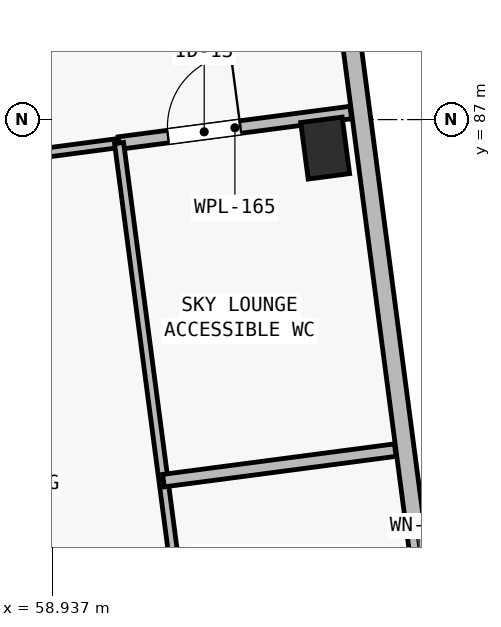
"""IFC4 building model, lengths in metres.
Left out: names, types, materials, properties, quantities, classifications, styles, units other than length and angle.
Written with IfcOpenShell. Run it as: python <this file> out.ifc"""

import sys

from ifc_helpers import new_model, si_unit, direction, frame, frame_2d, origin, origin_2d, place, context, subcontext, project, spatial, rectangle, extrude, element, fill, save


model = new_model("IFC4")
c1 = context("Model", 3, precision=1e-05, world=origin(), true_north=direction((0.0, 1.0)))
c2 = subcontext(c1, "Body", "Model", "MODEL_VIEW")
j1 = project(units=[si_unit("LENGTHUNIT", "METRE"), si_unit("PLANEANGLEUNIT", "RADIAN")], contexts=[c1])
p1 = place(None, origin())
s1 = spatial("IfcSite", under=j1, at=p1, CompositionType="ELEMENT")
p2 = place(p1, origin())
s2 = spatial("IfcBuilding", under=s1, at=p2, CompositionType="ELEMENT")
p3 = place(p2, frame((0.0, 0.0, 14.9)))
s3 = spatial("IfcBuildingStorey", under=s2, at=p3, CompositionType="ELEMENT", Elevation=14.9)
p4 = place(p3, frame((62.53, 86.625, 0.0), z_axis=(0.0, 0.0, 1.0), x_axis=(0.991444861374, 0.13052619222, 0.0)))
e1 = element("IfcColumn", 1, at=p4, inside=s3, PredefinedType="COLUMN", context=c2, shape_type="SweptSolid", body=[
    extrude(rectangle(XDim=0.55, YDim=0.75, at=origin_2d()), origin(), (0.0, 0.0, 1.0), 3.25),
])
p5 = place(p3, frame((61.39, 99.31, 0.0), z_axis=(0.0, 0.0, 1.0), x_axis=(0.13052411616, -0.99144513469, 0.0)))
e2 = element("IfcWall", 2, at=p5, inside=s3, PredefinedType="SOLIDWALL", context=c2, shape_type="SweptSolid", body=[
    extrude(rectangle(XDim=21.05, YDim=0.24, at=frame_2d((10.525, 0.0))), origin(), (0.0, 0.0, 1.0), 3.0),
])
p6 = place(p5, frame((2.45, 0.0, 0.45)))
e3 = element("IfcOpeningElement", 3, at=p6, cuts=e2, PredefinedType="OPENING", context=c2, shape_type="SweptSolid", body=[
    extrude(rectangle(XDim=0.68, YDim=2.24, at=frame_2d((0.34, 1.12))), frame((0.0, 0.135, 0.0), z_axis=(0.0, -1.0, 0.0), x_axis=(1.0, 0.0, 0.0)), (0.0, 0.0, 1.0), 0.27),
])
p7 = place(p5, frame((17.78, 0.0, 0.52)))
e4 = element("IfcOpeningElement", 4, at=p7, cuts=e2, PredefinedType="OPENING", context=c2, shape_type="SweptSolid", body=[
    extrude(rectangle(XDim=0.82, YDim=2.18, at=frame_2d((0.41, 1.09))), frame((0.0, 0.135, 0.0), z_axis=(0.0, -1.0, 0.0), x_axis=(1.0, 0.0, 0.0)), (0.0, 0.0, 1.0), 0.27),
])
p8 = place(p3, frame((54.033, 85.93, 0.0), z_axis=(0.0, 0.0, 1.0), x_axis=(0.991442898952, 0.130541097431, 0.0)))
e5 = element("IfcWall", 5, at=p8, inside=s3, PredefinedType="PARTITIONING", context=c2, shape_type="SweptSolid", body=[
    extrude(rectangle(XDim=5.835, YDim=0.12, at=frame_2d((2.917, 0.0))), origin(), (0.0, 0.0, 1.0), 2.97),
])
p9 = place(p8, frame((1.15, 0.0, 0.0)))
e6 = element("IfcOpeningElement", 6, at=p9, cuts=e5, PredefinedType="OPENING", context=c2, shape_type="SweptSolid", body=[
    extrude(rectangle(XDim=1.15, YDim=2.15, at=frame_2d((0.575, 1.075))), frame((0.0, 0.075, 0.0), z_axis=(0.0, -1.0, 0.0), x_axis=(1.0, 0.0, 0.0)), (0.0, 0.0, 1.0), 0.15),
])
p10 = place(p3, frame((59.818, 86.692, 0.0), z_axis=(0.0, 0.0, 1.0), x_axis=(0.991444293548, 0.130530505213, 0.0)))
e7 = element("IfcWall", 7, at=p10, inside=s3, PredefinedType="PLUMBINGWALL", context=c2, shape_type="SweptSolid", body=[
    extrude(rectangle(XDim=3.075, YDim=0.165, at=frame_2d((1.538, 0.0))), origin(), (0.0, 0.0, 1.0), 2.97),
])
p11 = place(p10, frame((0.65, 0.0, 0.0)))
e8 = element("IfcOpeningElement", 8, at=p11, cuts=e7, PredefinedType="OPENING", context=c2, shape_type="SweptSolid", body=[
    extrude(rectangle(XDim=0.96, YDim=2.12, at=frame_2d((0.48, 1.06))), frame((0.0, 0.097, 0.0), z_axis=(0.0, -1.0, 0.0), x_axis=(1.0, 0.0, 0.0)), (0.0, 0.0, 1.0), 0.195),
])
p12 = place(p3, frame((60.942, 78.155, 0.0), z_axis=(0.0, 0.0, 1.0), x_axis=(-0.13051979335, 0.99144570378, 0.0)))
e9 = element("IfcWall", 9, at=p12, inside=s3, PredefinedType="PARTITIONING", context=c2, shape_type="SweptSolid", body=[
    extrude(rectangle(XDim=8.61, YDim=0.12, at=frame_2d((4.305, 0.0))), origin(), (0.0, 0.0, 1.0), 2.97),
])
p13 = place(p12, frame((1.25, 0.0, 0.0)))
e10 = element("IfcOpeningElement", 10, at=p13, cuts=e9, PredefinedType="OPENING", context=c2, shape_type="SweptSolid", body=[
    extrude(rectangle(XDim=0.9, YDim=2.1, at=frame_2d((0.45, 1.05))), frame((0.0, 0.075, 0.0), z_axis=(0.0, -1.0, 0.0), x_axis=(1.0, 0.0, 0.0)), (0.0, 0.0, 1.0), 0.15),
])
p14 = place(p3, frame((60.403, 82.25, 0.0), z_axis=(0.0, 0.0, 1.0), x_axis=(0.991444293548, 0.130530505213, 0.0)))
e11 = element("IfcWall", 11, at=p14, inside=s3, PredefinedType="PLUMBINGWALL", context=c2, shape_type="SweptSolid", body=[
    extrude(rectangle(XDim=3.075, YDim=0.165, at=frame_2d((1.538, 0.0))), origin(), (0.0, 0.0, 1.0), 2.97),
])
p15 = place(p7, origin())
e12 = element("IfcWindow", 12, at=p15, inside=s3, PartitioningType="SINGLE_PANEL", PredefinedType="WINDOW", context=c2, shape_type="SweptSolid", body=[
    extrude(rectangle(XDim=0.82, YDim=2.18, at=frame_2d((0.41, 1.09))), frame((0.0, 0.03, 0.0), z_axis=(0.0, -1.0, 0.0), x_axis=(1.0, 0.0, 0.0)), (0.0, 0.0, 1.0), 0.06),
])
fill(e4, e12)
p16 = place(p11, origin())
e13 = element("IfcDoor", 13, at=p16, inside=s3, OperationType="SINGLE_SWING_RIGHT", PredefinedType="DOOR", context=c2, shape_type="SweptSolid", body=[
    extrude(rectangle(XDim=0.96, YDim=2.12, at=frame_2d((0.48, 1.06))), frame((0.0, 0.025, 0.0), z_axis=(0.0, -1.0, 0.0), x_axis=(1.0, 0.0, 0.0)), (0.0, 0.0, 1.0), 0.05),
])
fill(e8, e13)
save(model, sys.argv[1])
